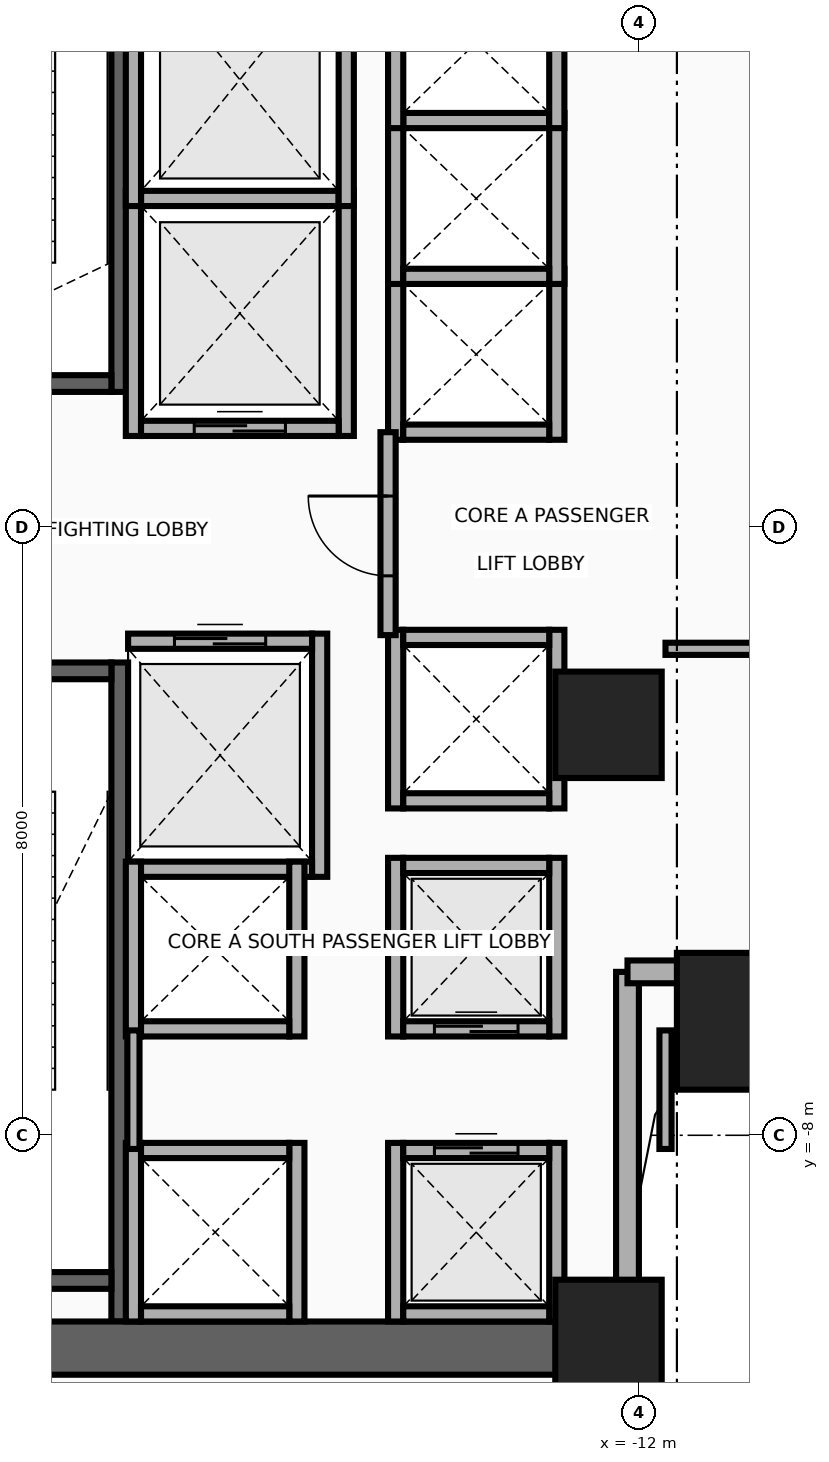
"""IFC4 building model, lengths in metres.
Left out: names, types, materials, properties, quantities, classifications, styles, units other than length and angle.
Written with IfcOpenShell. Run it as: python <this file> out.ifc"""

import sys

from ifc_helpers import new_model, si_unit, direction, frame, frame_2d, origin, origin_2d, place, context, subcontext, project, spatial, rectangle, extrude, source, transform, mapped, element, fill, save


model = new_model("IFC4")
c1 = context("Model", 3, precision=1e-05, world=origin(), true_north=direction((0.0, 1.0)))
c2 = subcontext(c1, "Body", "Model", "MODEL_VIEW")
j1 = project(units=[si_unit("LENGTHUNIT", "METRE"), si_unit("PLANEANGLEUNIT", "RADIAN")], contexts=[c1])
p1 = place(None, origin())
s1 = spatial("IfcSite", under=j1, at=p1, CompositionType="ELEMENT")
p2 = place(p1, origin())
s2 = spatial("IfcBuilding", under=s1, at=p2, CompositionType="ELEMENT")
p3 = place(p2, frame((0.0, 0.0, 5.2)))
s3 = spatial("IfcBuildingStorey", under=s2, at=p3, CompositionType="ELEMENT", Elevation=5.2)
p4 = place(p3, frame((-18.83, 1.78, 0.0), z_axis=(0.0, 0.0, 1.0), x_axis=(0.0, 1.0, 0.0)))
e1 = element("IfcWall", 1, at=p4, inside=s3, PredefinedType="SHEAR", context=c2, shape_type="SweptSolid", body=[
    extrude(rectangle(XDim=8.67, YDim=0.22, at=frame_2d((4.335, 0.0))), origin(), (0.0, 0.0, 1.0), 4.92),
])
p5 = place(p3, frame((-22.05, 1.89, 0.0), z_axis=(0.0, 0.0, 1.0), x_axis=(1.0, 0.0, 0.0)))
e2 = element("IfcWall", 2, at=p5, inside=s3, PredefinedType="SHEAR", context=c2, shape_type="SweptSolid", body=[
    extrude(rectangle(XDim=3.11, YDim=0.22, at=frame_2d((1.555, 0.0))), origin(), (0.0, 0.0, 1.0), 4.92),
])
p6 = place(p5, frame((1.0, 0.0, 0.0)))
e3 = element("IfcOpeningElement", 3, at=p6, cuts=e2, PredefinedType="OPENING", context=c2, shape_type="SweptSolid", body=[
    extrude(rectangle(XDim=1.1, YDim=2.15, at=frame_2d((0.55, 1.075))), frame((0.0, 0.125, 0.0), z_axis=(0.0, -1.0, 0.0), x_axis=(1.0, 0.0, 0.0)), (0.0, 0.0, 1.0), 0.25),
])
p7 = place(p3, frame((-18.83, -10.45, 0.0), z_axis=(0.0, 0.0, 1.0), x_axis=(0.0, 1.0, 0.0)))
e4 = element("IfcWall", 4, at=p7, inside=s3, PredefinedType="SHEAR", context=c2, shape_type="SweptSolid", body=[
    extrude(rectangle(XDim=8.67, YDim=0.22, at=frame_2d((4.335, 0.0))), origin(), (0.0, 0.0, 1.0), 4.92),
])
p8 = place(p3, frame((-22.05, -9.91, 0.0), z_axis=(0.0, 0.0, 1.0), x_axis=(1.0, 0.0, 0.0)))
e5 = element("IfcWall", 5, at=p8, inside=s3, PredefinedType="SHEAR", context=c2, shape_type="SweptSolid", body=[
    extrude(rectangle(XDim=3.11, YDim=0.22, at=frame_2d((1.555, 0.0))), origin(), (0.0, 0.0, 1.0), 4.92),
])
p9 = place(p3, frame((-22.05, -1.89, 0.0), z_axis=(0.0, 0.0, 1.0), x_axis=(1.0, 0.0, 0.0)))
e6 = element("IfcWall", 6, at=p9, inside=s3, PredefinedType="SHEAR", context=c2, shape_type="SweptSolid", body=[
    extrude(rectangle(XDim=3.11, YDim=0.22, at=frame_2d((1.555, 0.0))), origin(), (0.0, 0.0, 1.0), 4.92),
])
p10 = place(p9, frame((1.0, 0.0, 0.0)))
e7 = element("IfcOpeningElement", 7, at=p10, cuts=e6, PredefinedType="OPENING", context=c2, shape_type="SweptSolid", body=[
    extrude(rectangle(XDim=1.1, YDim=2.15, at=frame_2d((0.55, 1.075))), frame((0.0, 0.125, 0.0), z_axis=(0.0, -1.0, 0.0), x_axis=(1.0, 0.0, 0.0)), (0.0, 0.0, 1.0), 0.25),
])
p11 = place(p3, frame((-22.65, -10.8, 0.0), z_axis=(0.0, 0.0, 1.0), x_axis=(1.0, 0.0, 0.0)))
e8 = element("IfcWall", 8, at=p11, inside=s3, PredefinedType="SHEAR", context=c2, shape_type="SweptSolid", body=[
    extrude(rectangle(XDim=10.25, YDim=0.7, at=frame_2d((5.125, 0.0))), origin(), (0.0, 0.0, 1.0), 4.92),
])
m1 = source(origin(), c2, "Body", "SweptSolid", [
    extrude(rectangle(XDim=1.4, YDim=1.4, at=origin_2d()), origin(), (0.0, 0.0, 1.0), 5.2),
])
for number, where, z_axis, x_axis in (
    (9, (-12.4, -10.6, 0.0), (0.0, 0.0, 1.0), (1.0, 0.0, 0.0)),
    (10, (-12.4, -2.6, 0.0), (0.0, 0.0, 1.0), (1.0, 0.0, 0.0)),
):
    element("IfcColumn", number, at=place(p3, frame(where, z_axis=z_axis, x_axis=x_axis)), inside=s3, PredefinedType="COLUMN", context=c2, shape_type="MappedRepresentation", body=[
        mapped(m1, transform((0.0, 0.0, 0.0), x_axis=(1.0, 0.0, 0.0), y_axis=(0.0, 1.0, 0.0), z_axis=(0.0, 0.0, 1.0), scale=1.0)),
    ])
m2 = source(origin(), c2, "Body", "SweptSolid", [
    extrude(rectangle(XDim=1.8, YDim=1.8, at=origin_2d()), origin(), (0.0, 0.0, 1.0), 5.2),
])
p12 = place(p3, frame((-10.6, -6.5, 0.0), z_axis=(0.0, 0.0, 1.0), x_axis=(1.0, 0.0, 0.0)))
e11 = element("IfcColumn", 11, at=p12, inside=s3, PredefinedType="COLUMN", context=c2, shape_type="MappedRepresentation", body=[
    mapped(m2, transform((0.0, 0.0, 0.0), x_axis=(1.0, 0.0, 0.0), y_axis=(0.0, 1.0, 0.0), z_axis=(0.0, 0.0, 1.0), scale=1.0)),
])
p13 = place(p3, frame((-12.15, -22.85, 0.0), z_axis=(0.0, 0.0, 1.0), x_axis=(0.0, 1.0, 0.0)))
e12 = element("IfcWall", 12, at=p13, inside=s3, PredefinedType="SOLIDWALL", context=c2, shape_type="SweptSolid", body=[
    extrude(rectangle(XDim=17.0, YDim=0.3, at=frame_2d((8.5, 0.0))), origin(), (0.0, 0.0, 1.0), 3.957),
])
p14 = place(p3, frame((-12.15, -5.85, 0.0), z_axis=(0.0, 0.0, 1.0), x_axis=(1.0, 0.0, 0.0)))
e13 = element("IfcWall", 13, at=p14, inside=s3, PredefinedType="SOLIDWALL", context=c2, shape_type="SweptSolid", body=[
    extrude(rectangle(XDim=2.63, YDim=0.3, at=frame_2d((1.315, 0.0))), origin(), (0.0, 0.0, 1.0), 4.92),
])
for number, where, z_axis, x_axis in (
    (14, (-18.65, 1.2, 0.0), (0.0, 0.0, 1.0), (0.0, 1.0, 0.0)),
    (15, (-15.85, 1.2, 0.0), (0.0, 0.0, 1.0), (0.0, 1.0, 0.0)),
):
    element("IfcWall", number, at=place(p3, frame(where, z_axis=z_axis, x_axis=x_axis)), inside=s3, PredefinedType="MOVABLE", context=c2, shape_type="SweptSolid", body=[
        extrude(rectangle(XDim=3.225, YDim=0.2, at=frame_2d((1.613, 0.0))), origin(), (0.0, 0.0, 1.0), 4.92),
    ])
p15 = place(p3, frame((-18.55, 1.3, 0.0), z_axis=(0.0, 0.0, 1.0), x_axis=(1.0, 0.0, 0.0)))
e16 = element("IfcWall", 16, at=p15, inside=s3, PredefinedType="MOVABLE", context=c2, shape_type="SweptSolid", body=[
    extrude(rectangle(XDim=2.6, YDim=0.2, at=frame_2d((1.3, 0.0))), origin(), (0.0, 0.0, 1.0), 4.92),
])
p16 = place(p15, frame((0.7, 0.0, 0.0)))
e17 = element("IfcOpeningElement", 17, at=p16, cuts=e16, PredefinedType="OPENING", context=c2, shape_type="SweptSolid", body=[
    extrude(rectangle(XDim=1.2, YDim=2.1, at=frame_2d((0.6, 1.05))), frame((0.0, 0.115, 0.0), z_axis=(0.0, -1.0, 0.0), x_axis=(1.0, 0.0, 0.0)), (0.0, 0.0, 1.0), 0.23),
])
p17 = place(p3, frame((-18.55, 4.325, 0.0), z_axis=(0.0, 0.0, 1.0), x_axis=(1.0, 0.0, 0.0)))
e18 = element("IfcWall", 18, at=p17, inside=s3, PredefinedType="MOVABLE", context=c2, shape_type="SweptSolid", body=[
    extrude(rectangle(XDim=2.6, YDim=0.2, at=frame_2d((1.3, 0.0))), origin(), (0.0, 0.0, 1.0), 4.92),
])
p18 = place(p3, frame((-16.2, -4.6, 0.0), z_axis=(0.0, 0.0, 1.0), x_axis=(0.0, 1.0, 0.0)))
e19 = element("IfcWall", 19, at=p18, inside=s3, PredefinedType="MOVABLE", context=c2, shape_type="SweptSolid", body=[
    extrude(rectangle(XDim=3.2, YDim=0.2, at=frame_2d((1.6, 0.0))), origin(), (0.0, 0.0, 1.0), 4.92),
])
p19 = place(p3, frame((-18.72, -4.5, 0.0), z_axis=(0.0, 0.0, 1.0), x_axis=(1.0, 0.0, 0.0)))
e20 = element("IfcWall", 20, at=p19, inside=s3, PredefinedType="MOVABLE", context=c2, shape_type="SweptSolid", body=[
    extrude(rectangle(XDim=2.42, YDim=0.2, at=frame_2d((1.21, 0.0))), origin(), (0.0, 0.0, 1.0), 4.92),
])
p20 = place(p3, frame((-18.72, -1.5, 0.0), z_axis=(0.0, 0.0, 1.0), x_axis=(1.0, 0.0, 0.0)))
e21 = element("IfcWall", 21, at=p20, inside=s3, PredefinedType="MOVABLE", context=c2, shape_type="SweptSolid", body=[
    extrude(rectangle(XDim=2.42, YDim=0.2, at=frame_2d((1.21, 0.0))), origin(), (0.0, 0.0, 1.0), 4.92),
])
p21 = place(p20, frame((0.61, 0.0, 0.0)))
e22 = element("IfcOpeningElement", 22, at=p21, cuts=e21, PredefinedType="OPENING", context=c2, shape_type="SweptSolid", body=[
    extrude(rectangle(XDim=1.2, YDim=2.1, at=frame_2d((0.6, 1.05))), frame((0.0, 0.115, 0.0), z_axis=(0.0, -1.0, 0.0), x_axis=(1.0, 0.0, 0.0)), (0.0, 0.0, 1.0), 0.23),
])
for number, where, z_axis, x_axis in (
    (23, (-18.65, 4.225, 0.0), (0.0, 0.0, 1.0), (0.0, 1.0, 0.0)),
    (24, (-15.85, 4.225, 0.0), (0.0, 0.0, 1.0), (0.0, 1.0, 0.0)),
):
    element("IfcWall", number, at=place(p3, frame(where, z_axis=z_axis, x_axis=x_axis)), inside=s3, PredefinedType="MOVABLE", context=c2, shape_type="SweptSolid", body=[
        extrude(rectangle(XDim=3.325, YDim=0.2, at=frame_2d((1.663, 0.0))), origin(), (0.0, 0.0, 1.0), 4.92),
    ])
for number, where, z_axis, x_axis in (
    (25, (-15.2, -10.45, 0.0), (0.0, 0.0, 1.0), (0.0, 1.0, 0.0)),
    (26, (-13.08, -10.45, 0.0), (0.0, 0.0, 1.0), (0.0, 1.0, 0.0)),
):
    element("IfcWall", number, at=place(p3, frame(where, z_axis=z_axis, x_axis=x_axis)), inside=s3, PredefinedType="MOVABLE", context=c2, shape_type="SweptSolid", body=[
        extrude(rectangle(XDim=2.35, YDim=0.2, at=frame_2d((1.175, 0.0))), origin(), (0.0, 0.0, 1.0), 3.957),
    ])
p22 = place(p3, frame((-15.1, -10.35, 0.0), z_axis=(0.0, 0.0, 1.0), x_axis=(1.0, 0.0, 0.0)))
e27 = element("IfcWall", 27, at=p22, inside=s3, PredefinedType="MOVABLE", context=c2, shape_type="SweptSolid", body=[
    extrude(rectangle(XDim=1.92, YDim=0.2, at=frame_2d((0.96, 0.0))), origin(), (0.0, 0.0, 1.0), 3.957),
])
p23 = place(p3, frame((-15.1, -8.2, 0.0), z_axis=(0.0, 0.0, 1.0), x_axis=(1.0, 0.0, 0.0)))
e28 = element("IfcWall", 28, at=p23, inside=s3, PredefinedType="MOVABLE", context=c2, shape_type="SweptSolid", body=[
    extrude(rectangle(XDim=1.92, YDim=0.2, at=frame_2d((0.96, 0.0))), origin(), (0.0, 0.0, 1.0), 4.92),
])
p24 = place(p23, frame((0.41, 0.0, 0.0)))
e29 = element("IfcOpeningElement", 29, at=p24, cuts=e28, PredefinedType="OPENING", context=c2, shape_type="SweptSolid", body=[
    extrude(rectangle(XDim=1.1, YDim=2.1, at=frame_2d((0.55, 1.05))), frame((0.0, 0.115, 0.0), z_axis=(0.0, -1.0, 0.0), x_axis=(1.0, 0.0, 0.0)), (0.0, 0.0, 1.0), 0.23),
])
for number, where, z_axis, x_axis in (
    (30, (-15.2, -6.7, 0.0), (0.0, 0.0, 1.0), (0.0, 1.0, 0.0)),
    (31, (-13.08, -6.7, 0.0), (0.0, 0.0, 1.0), (0.0, 1.0, 0.0)),
):
    element("IfcWall", number, at=place(p3, frame(where, z_axis=z_axis, x_axis=x_axis)), inside=s3, PredefinedType="MOVABLE", context=c2, shape_type="SweptSolid", body=[
        extrude(rectangle(XDim=2.35, YDim=0.2, at=frame_2d((1.175, 0.0))), origin(), (0.0, 0.0, 1.0), 4.92),
    ])
p25 = place(p3, frame((-15.1, -6.6, 0.0), z_axis=(0.0, 0.0, 1.0), x_axis=(1.0, 0.0, 0.0)))
e32 = element("IfcWall", 32, at=p25, inside=s3, PredefinedType="MOVABLE", context=c2, shape_type="SweptSolid", body=[
    extrude(rectangle(XDim=1.92, YDim=0.2, at=frame_2d((0.96, 0.0))), origin(), (0.0, 0.0, 1.0), 4.92),
])
p26 = place(p25, frame((0.41, 0.0, 0.0)))
e33 = element("IfcOpeningElement", 33, at=p26, cuts=e32, PredefinedType="OPENING", context=c2, shape_type="SweptSolid", body=[
    extrude(rectangle(XDim=1.1, YDim=2.1, at=frame_2d((0.55, 1.05))), frame((0.0, 0.115, 0.0), z_axis=(0.0, -1.0, 0.0), x_axis=(1.0, 0.0, 0.0)), (0.0, 0.0, 1.0), 0.23),
])
p27 = place(p3, frame((-15.1, -4.45, 0.0), z_axis=(0.0, 0.0, 1.0), x_axis=(1.0, 0.0, 0.0)))
e34 = element("IfcWall", 34, at=p27, inside=s3, PredefinedType="MOVABLE", context=c2, shape_type="SweptSolid", body=[
    extrude(rectangle(XDim=1.92, YDim=0.2, at=frame_2d((0.96, 0.0))), origin(), (0.0, 0.0, 1.0), 4.92),
])
for number, where, z_axis, x_axis in (
    (35, (-18.65, -10.45, 0.0), (0.0, 0.0, 1.0), (0.0, 1.0, 0.0)),
    (36, (-16.5, -10.45, 0.0), (0.0, 0.0, 1.0), (0.0, 1.0, 0.0)),
):
    element("IfcWall", number, at=place(p3, frame(where, z_axis=z_axis, x_axis=x_axis)), inside=s3, PredefinedType="MOVABLE", context=c2, shape_type="SweptSolid", body=[
        extrude(rectangle(XDim=2.35, YDim=0.2, at=frame_2d((1.175, 0.0))), origin(), (0.0, 0.0, 1.0), 3.957),
    ])
p28 = place(p3, frame((-18.55, -10.35, 0.0), z_axis=(0.0, 0.0, 1.0), x_axis=(1.0, 0.0, 0.0)))
e37 = element("IfcWall", 37, at=p28, inside=s3, PredefinedType="MOVABLE", context=c2, shape_type="SweptSolid", body=[
    extrude(rectangle(XDim=1.95, YDim=0.2, at=frame_2d((0.975, 0.0))), origin(), (0.0, 0.0, 1.0), 3.957),
])
p29 = place(p3, frame((-18.55, -8.2, 0.0), z_axis=(0.0, 0.0, 1.0), x_axis=(1.0, 0.0, 0.0)))
e38 = element("IfcWall", 38, at=p29, inside=s3, PredefinedType="MOVABLE", context=c2, shape_type="SweptSolid", body=[
    extrude(rectangle(XDim=1.95, YDim=0.2, at=frame_2d((0.975, 0.0))), origin(), (0.0, 0.0, 1.0), 4.92),
])
for number, where, z_axis, x_axis in (
    (39, (-15.2, 1.15, 0.0), (0.0, 0.0, 1.0), (0.0, 1.0, 0.0)),
    (40, (-13.08, 1.15, 0.0), (0.0, 0.0, 1.0), (0.0, 1.0, 0.0)),
):
    element("IfcWall", number, at=place(p3, frame(where, z_axis=z_axis, x_axis=x_axis)), inside=s3, PredefinedType="MOVABLE", context=c2, shape_type="SweptSolid", body=[
        extrude(rectangle(XDim=2.25, YDim=0.2, at=frame_2d((1.125, 0.0))), origin(), (0.0, 0.0, 1.0), 4.92),
    ])
p30 = place(p3, frame((-15.1, 1.25, 0.0), z_axis=(0.0, 0.0, 1.0), x_axis=(1.0, 0.0, 0.0)))
e41 = element("IfcWall", 41, at=p30, inside=s3, PredefinedType="MOVABLE", context=c2, shape_type="SweptSolid", body=[
    extrude(rectangle(XDim=1.92, YDim=0.2, at=frame_2d((0.96, 0.0))), origin(), (0.0, 0.0, 1.0), 4.92),
])
for number, where, z_axis, x_axis in (
    (42, (-15.2, 3.2, 0.0), (0.0, 0.0, 1.0), (0.0, 1.0, 0.0)),
    (43, (-13.08, 3.2, 0.0), (0.0, 0.0, 1.0), (0.0, 1.0, 0.0)),
):
    element("IfcWall", number, at=place(p3, frame(where, z_axis=z_axis, x_axis=x_axis)), inside=s3, PredefinedType="MOVABLE", context=c2, shape_type="SweptSolid", body=[
        extrude(rectangle(XDim=2.25, YDim=0.2, at=frame_2d((1.125, 0.0))), origin(), (0.0, 0.0, 1.0), 4.92),
    ])
for number, where, z_axis, x_axis in (
    (44, (-15.1, 3.3, 0.0), (0.0, 0.0, 1.0), (1.0, 0.0, 0.0)),
    (45, (-15.1, 5.35, 0.0), (0.0, 0.0, 1.0), (1.0, 0.0, 0.0)),
):
    element("IfcWall", number, at=place(p3, frame(where, z_axis=z_axis, x_axis=x_axis)), inside=s3, PredefinedType="MOVABLE", context=c2, shape_type="SweptSolid", body=[
        extrude(rectangle(XDim=1.92, YDim=0.2, at=frame_2d((0.96, 0.0))), origin(), (0.0, 0.0, 1.0), 4.92),
    ])
for number, where, z_axis, x_axis in (
    (46, (-15.2, 5.25, 0.0), (0.0, 0.0, 1.0), (0.0, 1.0, 0.0)),
    (47, (-13.08, 5.25, 0.0), (0.0, 0.0, 1.0), (0.0, 1.0, 0.0)),
):
    element("IfcWall", number, at=place(p3, frame(where, z_axis=z_axis, x_axis=x_axis)), inside=s3, PredefinedType="MOVABLE", context=c2, shape_type="SweptSolid", body=[
        extrude(rectangle(XDim=2.25, YDim=0.2, at=frame_2d((1.125, 0.0))), origin(), (0.0, 0.0, 1.0), 4.92),
    ])
for number, where, z_axis, x_axis in (
    (48, (-18.65, -6.7, 0.0), (0.0, 0.0, 1.0), (0.0, 1.0, 0.0)),
    (49, (-16.5, -6.7, 0.0), (0.0, 0.0, 1.0), (0.0, 1.0, 0.0)),
):
    element("IfcWall", number, at=place(p3, frame(where, z_axis=z_axis, x_axis=x_axis)), inside=s3, PredefinedType="MOVABLE", context=c2, shape_type="SweptSolid", body=[
        extrude(rectangle(XDim=2.3, YDim=0.2, at=frame_2d((1.15, 0.0))), origin(), (0.0, 0.0, 1.0), 4.92),
    ])
p31 = place(p3, frame((-18.55, -6.6, 0.0), z_axis=(0.0, 0.0, 1.0), x_axis=(1.0, 0.0, 0.0)))
e50 = element("IfcWall", 50, at=p31, inside=s3, PredefinedType="MOVABLE", context=c2, shape_type="SweptSolid", body=[
    extrude(rectangle(XDim=1.95, YDim=0.2, at=frame_2d((0.975, 0.0))), origin(), (0.0, 0.0, 1.0), 4.92),
])
for number, where, z_axis, x_axis in (
    (51, (-15.2, -3.7, 0.0), (0.0, 0.0, 1.0), (0.0, 1.0, 0.0)),
    (52, (-13.08, -3.7, 0.0), (0.0, 0.0, 1.0), (0.0, 1.0, 0.0)),
):
    element("IfcWall", number, at=place(p3, frame(where, z_axis=z_axis, x_axis=x_axis)), inside=s3, PredefinedType="MOVABLE", context=c2, shape_type="SweptSolid", body=[
        extrude(rectangle(XDim=2.35, YDim=0.2, at=frame_2d((1.175, 0.0))), origin(), (0.0, 0.0, 1.0), 4.92),
    ])
for number, where, z_axis, x_axis in (
    (53, (-15.1, -3.6, 0.0), (0.0, 0.0, 1.0), (1.0, 0.0, 0.0)),
    (54, (-15.1, -1.45, 0.0), (0.0, 0.0, 1.0), (1.0, 0.0, 0.0)),
):
    element("IfcWall", number, at=place(p3, frame(where, z_axis=z_axis, x_axis=x_axis)), inside=s3, PredefinedType="MOVABLE", context=c2, shape_type="SweptSolid", body=[
        extrude(rectangle(XDim=1.92, YDim=0.2, at=frame_2d((0.96, 0.0))), origin(), (0.0, 0.0, 1.0), 4.92),
    ])
p32 = place(p3, frame((-15.3, -1.42, 0.0), z_axis=(0.0, 0.0, 1.0), x_axis=(0.0, 1.0, 0.0)))
e55 = element("IfcWall", 55, at=p32, inside=s3, PredefinedType="PARTITIONING", context=c2, shape_type="SweptSolid", body=[
    extrude(rectangle(XDim=2.67, YDim=0.2, at=frame_2d((1.335, 0.0))), origin(), (0.0, 0.0, 1.0), 4.92),
])
p33 = place(p32, frame((0.78, 0.0, 0.0)))
e56 = element("IfcOpeningElement", 56, at=p33, cuts=e55, PredefinedType="OPENING", context=c2, shape_type="SweptSolid", body=[
    extrude(rectangle(XDim=1.05, YDim=2.15, at=frame_2d((0.525, 1.075))), frame((0.0, 0.115, 0.0), z_axis=(0.0, -1.0, 0.0), x_axis=(1.0, 0.0, 0.0)), (0.0, 0.0, 1.0), 0.23),
])
p34 = place(p3, frame((-18.65, -8.18, 0.0), z_axis=(0.0, 0.0, 1.0), x_axis=(0.0, 1.0, 0.0)))
e57 = element("IfcWall", 57, at=p34, inside=s3, PredefinedType="PARTITIONING", context=c2, shape_type="SweptSolid", body=[
    extrude(rectangle(XDim=1.56, YDim=0.16, at=frame_2d((0.78, 0.0))), origin(), (0.0, 0.0, 1.0), 4.92),
])
p35 = place(p3, frame((-11.65, -8.18, 0.0), z_axis=(0.0, 0.0, 1.0), x_axis=(0.0, 1.0, 0.0)))
e58 = element("IfcWall", 58, at=p35, inside=s3, PredefinedType="PARTITIONING", context=c2, shape_type="SweptSolid", body=[
    extrude(rectangle(XDim=1.56, YDim=0.16, at=frame_2d((0.78, 0.0))), origin(), (0.0, 0.0, 1.0), 3.957),
])
p36 = place(p3, frame((-11.65, -1.6, 0.0), z_axis=(0.0, 0.0, 1.0), x_axis=(1.0, 0.0, 0.0)))
e59 = element("IfcWall", 59, at=p36, inside=s3, PredefinedType="PARTITIONING", context=c2, shape_type="SweptSolid", body=[
    extrude(rectangle(XDim=1.85, YDim=0.16, at=frame_2d((0.925, 0.0))), origin(), (0.0, 0.0, 1.0), 4.92),
])
p37 = place(p16, origin())
e60 = element("IfcDoor", 60, at=p37, inside=s3, OperationType="DOUBLE_DOOR_SLIDING", PredefinedType="DOOR", context=c2, shape_type="SweptSolid", body=[
    extrude(rectangle(XDim=1.2, YDim=2.1, at=frame_2d((0.6, 1.05))), frame((0.0, 0.025, 0.0), z_axis=(0.0, -1.0, 0.0), x_axis=(1.0, 0.0, 0.0)), (0.0, 0.0, 1.0), 0.05),
])
fill(e17, e60)
p38 = place(p21, origin())
e61 = element("IfcDoor", 61, at=p38, inside=s3, OperationType="DOUBLE_DOOR_SLIDING", PredefinedType="DOOR", context=c2, shape_type="SweptSolid", body=[
    extrude(rectangle(XDim=1.2, YDim=2.1, at=frame_2d((0.6, 1.05))), frame((0.0, 0.025, 0.0), z_axis=(0.0, -1.0, 0.0), x_axis=(1.0, 0.0, 0.0)), (0.0, 0.0, 1.0), 0.05),
])
fill(e22, e61)
p39 = place(p24, origin())
e62 = element("IfcDoor", 62, at=p39, inside=s3, OperationType="DOUBLE_DOOR_SLIDING", PredefinedType="DOOR", context=c2, shape_type="SweptSolid", body=[
    extrude(rectangle(XDim=1.1, YDim=2.1, at=frame_2d((0.55, 1.05))), frame((0.0, 0.025, 0.0), z_axis=(0.0, -1.0, 0.0), x_axis=(1.0, 0.0, 0.0)), (0.0, 0.0, 1.0), 0.05),
])
fill(e29, e62)
p40 = place(p26, origin())
e63 = element("IfcDoor", 63, at=p40, inside=s3, OperationType="DOUBLE_DOOR_SLIDING", PredefinedType="DOOR", context=c2, shape_type="SweptSolid", body=[
    extrude(rectangle(XDim=1.1, YDim=2.1, at=frame_2d((0.55, 1.05))), frame((0.0, 0.025, 0.0), z_axis=(0.0, -1.0, 0.0), x_axis=(1.0, 0.0, 0.0)), (0.0, 0.0, 1.0), 0.05),
])
fill(e33, e63)
p41 = place(p33, origin())
e64 = element("IfcDoor", 64, at=p41, inside=s3, OperationType="SINGLE_SWING_RIGHT", PredefinedType="DOOR", context=c2, shape_type="SweptSolid", body=[
    extrude(rectangle(XDim=1.05, YDim=2.15, at=frame_2d((0.525, 1.075))), frame((0.0, 0.025, 0.0), z_axis=(0.0, -1.0, 0.0), x_axis=(1.0, 0.0, 0.0)), (0.0, 0.0, 1.0), 0.05),
])
fill(e56, e64)
save(model, sys.argv[1])
